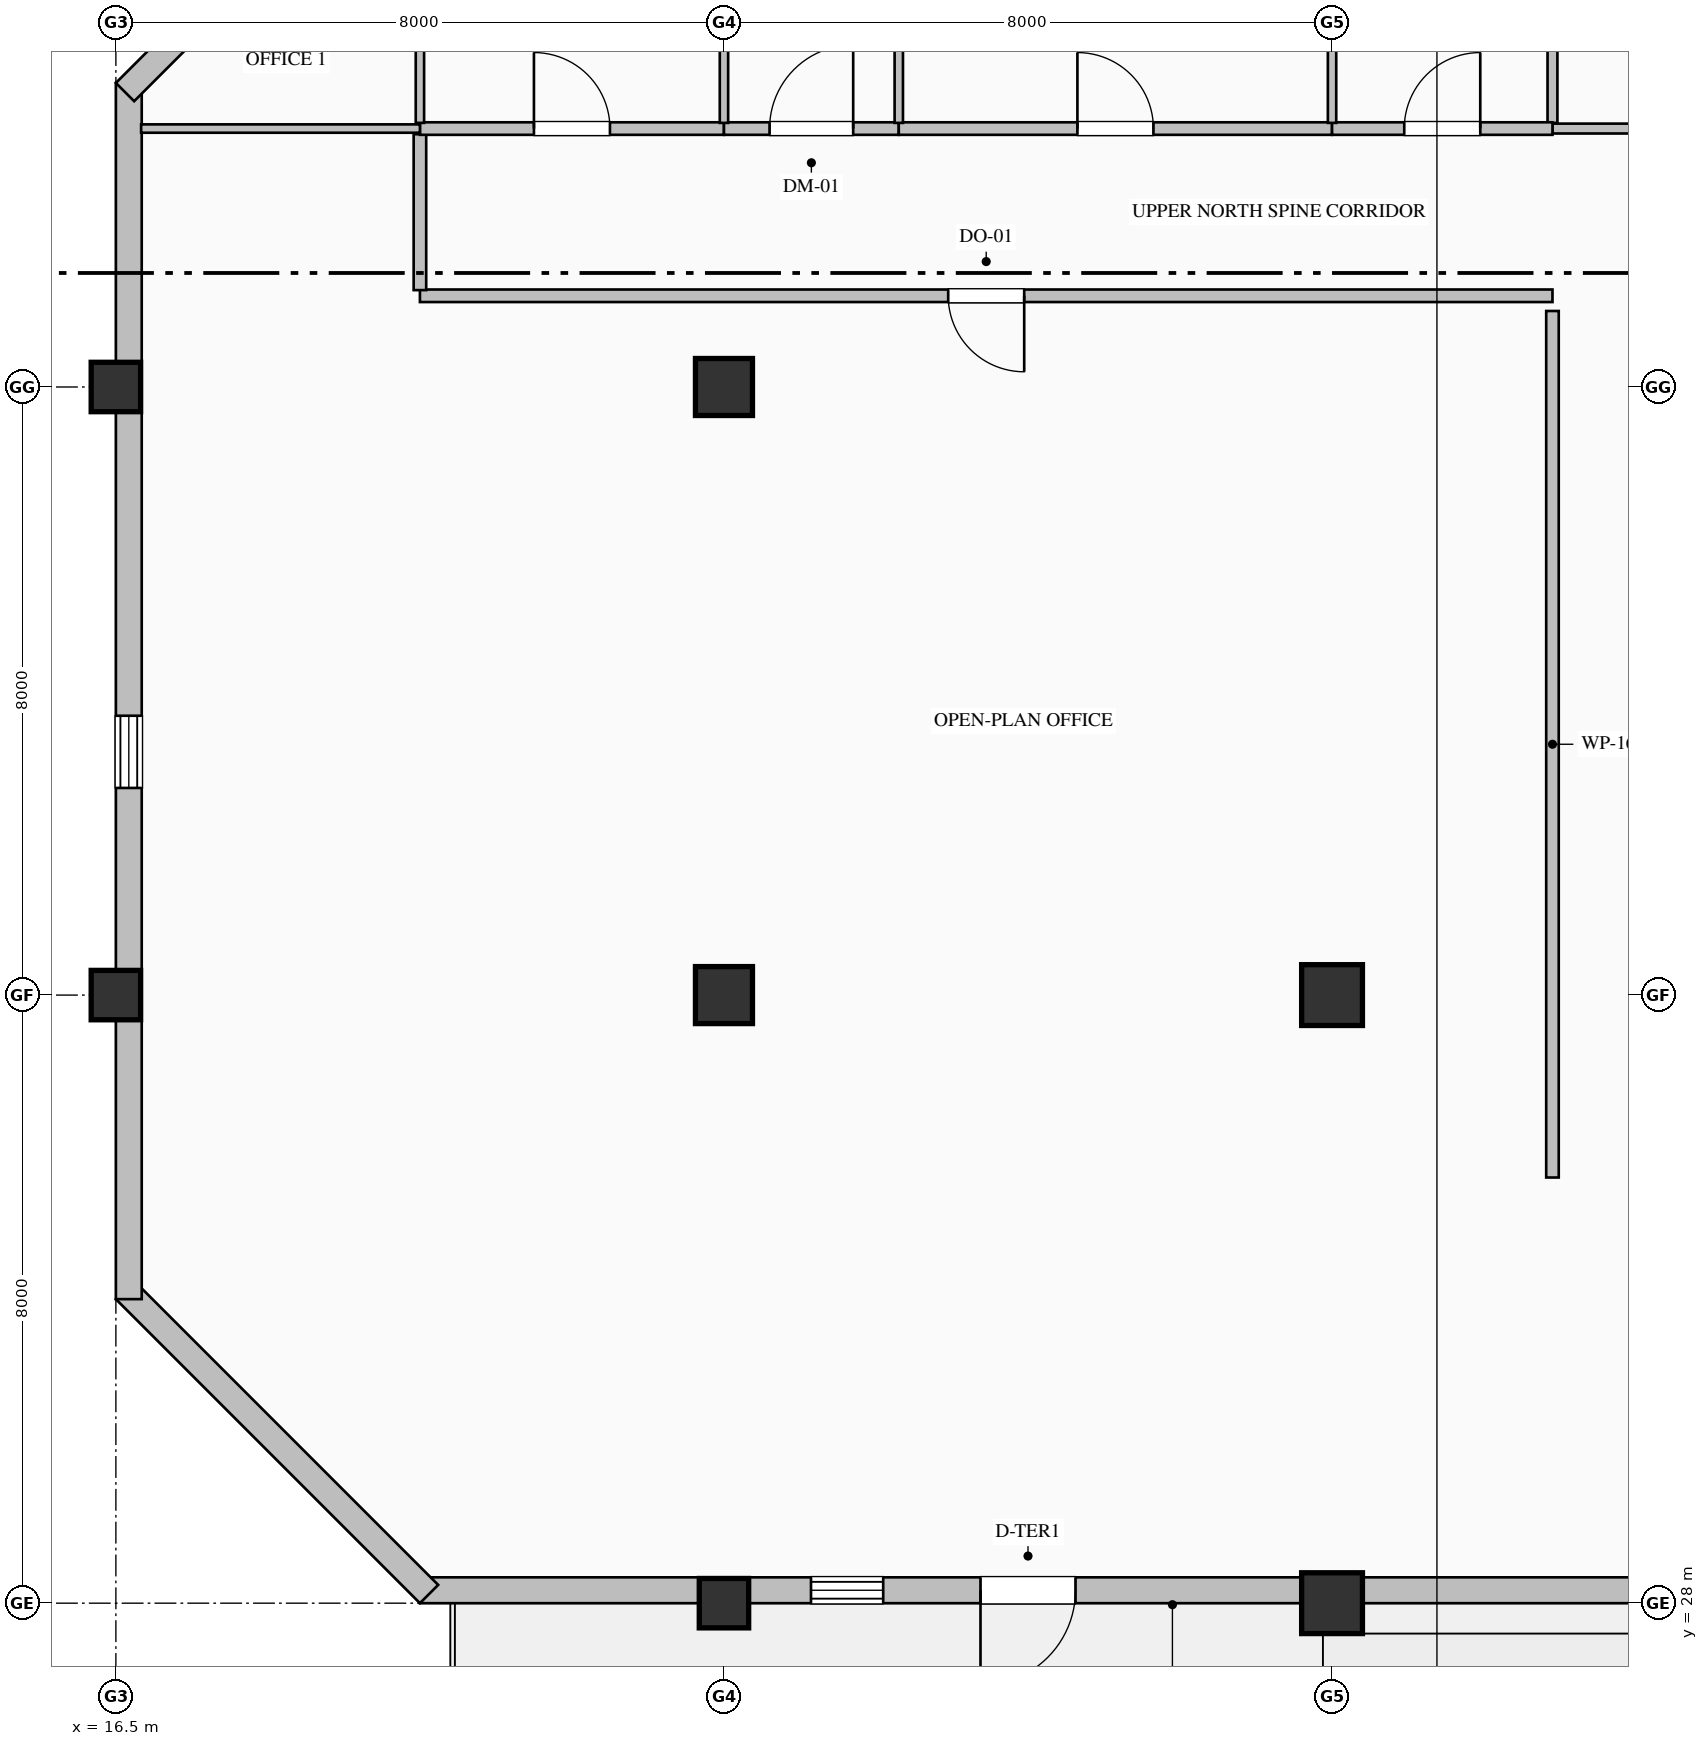
"""IFC4 building model, lengths in metres.
Left out: names, types, materials, properties, quantities, classifications, styles, units other than length and angle.
Written with IfcOpenShell. Run it as: python <this file> out.ifc"""

import sys

from ifc_helpers import new_model, si_unit, direction, frame, frame_2d, origin, origin_2d, place, context, subcontext, project, spatial, rectangle, hollow_rectangle, extrude, element, fill, save


model = new_model("IFC4")
c1 = context("Model", 3, precision=1e-05, world=origin(), true_north=direction((0.0, 1.0)))
c2 = subcontext(c1, "Body", "Model", "MODEL_VIEW")
j1 = project(units=[si_unit("LENGTHUNIT", "METRE"), si_unit("PLANEANGLEUNIT", "RADIAN")], contexts=[c1])
p1 = place(None, origin())
s1 = spatial("IfcSite", under=j1, at=p1, CompositionType="ELEMENT")
p2 = place(p1, origin())
s2 = spatial("IfcBuilding", under=s1, at=p2, CompositionType="ELEMENT")
p3 = place(p2, frame((0.0, 0.0, 295.2)))
s3 = spatial("IfcBuildingStorey", under=s2, at=p3, CompositionType="ELEMENT", Elevation=295.2)
for number, where, z_axis, x_axis in (
    (1, (16.5, 36.0, 0.0), (0.0, 0.0, 1.0), (1.0, 0.0, 0.0)),
    (2, (16.5, 44.0, 0.0), (0.0, 0.0, 1.0), (1.0, 0.0, 0.0)),
    (3, (24.5, 28.0, 0.0), (0.0, 0.0, 1.0), (1.0, 0.0, 0.0)),
):
    element("IfcColumn", number, at=place(p3, frame(where, z_axis=z_axis, x_axis=x_axis)), inside=s3, PredefinedType="COLUMN", context=c2, shape_type="SweptSolid", body=[
        extrude(hollow_rectangle(XDim=0.65, YDim=0.65, WallThickness=0.028, at=origin_2d()), origin(), (0.0, 0.0, 1.0), 4.0),
    ])
for number, where, z_axis, x_axis in (
    (4, (24.5, 36.0, 0.0), (0.0, 0.0, 1.0), (1.0, 0.0, 0.0)),
    (5, (24.5, 44.0, 0.0), (0.0, 0.0, 1.0), (1.0, 0.0, 0.0)),
):
    element("IfcColumn", number, at=place(p3, frame(where, z_axis=z_axis, x_axis=x_axis)), inside=s3, PredefinedType="COLUMN", context=c2, shape_type="SweptSolid", body=[
        extrude(rectangle(XDim=0.75, YDim=0.75, at=origin_2d()), origin(), (0.0, 0.0, 1.0), 4.0),
    ])
for number, where, z_axis, x_axis in (
    (6, (32.5, 28.0, 0.0), (0.0, 0.0, 1.0), (1.0, 0.0, 0.0)),
    (7, (32.5, 36.0, 0.0), (0.0, 0.0, 1.0), (1.0, 0.0, 0.0)),
):
    element("IfcColumn", number, at=place(p3, frame(where, z_axis=z_axis, x_axis=x_axis)), inside=s3, PredefinedType="COLUMN", context=c2, shape_type="SweptSolid", body=[
        extrude(hollow_rectangle(XDim=0.8, YDim=0.8, WallThickness=0.032, at=origin_2d()), origin(), (0.0, 0.0, 1.0), 4.0),
    ])
p4 = place(p3, frame((40.52, 28.17, 0.0), z_axis=(0.0, 0.0, 1.0), x_axis=(-1.0, 0.0, 0.0)))
e8 = element("IfcWall", 8, at=p4, inside=s3, PredefinedType="SOLIDWALL", context=c2, shape_type="SweptSolid", body=[
    extrude(rectangle(XDim=20.02, YDim=0.34, at=frame_2d((10.01, 0.0))), origin(), (0.0, 0.0, 1.0), 3.185),
])
p5 = place(p4, frame((3.125, 0.0, 0.9)))
e9 = element("IfcOpeningElement", 9, at=p5, cuts=e8, PredefinedType="OPENING", context=c2, shape_type="SweptSolid", body=[
    extrude(rectangle(XDim=0.95, YDim=1.85, at=frame_2d((0.475, 0.925))), frame((0.0, 0.18, 0.0), z_axis=(0.0, -1.0, 0.0), x_axis=(1.0, 0.0, 0.0)), (0.0, 0.0, 1.0), 0.36),
])
p6 = place(p4, frame((13.925, 0.0, 0.9)))
e10 = element("IfcOpeningElement", 10, at=p6, cuts=e8, PredefinedType="OPENING", context=c2, shape_type="SweptSolid", body=[
    extrude(rectangle(XDim=0.95, YDim=1.85, at=frame_2d((0.475, 0.925))), frame((0.0, 0.18, 0.0), z_axis=(0.0, -1.0, 0.0), x_axis=(1.0, 0.0, 0.0)), (0.0, 0.0, 1.0), 0.36),
])
p7 = place(p4, frame((11.395, 0.0, 0.0)))
e11 = element("IfcOpeningElement", 11, at=p7, cuts=e8, PredefinedType="OPENING", context=c2, shape_type="SweptSolid", body=[
    extrude(rectangle(XDim=1.25, YDim=2.25, at=frame_2d((0.625, 1.125))), frame((0.0, 0.18, 0.0), z_axis=(0.0, -1.0, 0.0), x_axis=(1.0, 0.0, 0.0)), (0.0, 0.0, 1.0), 0.36),
])
p8 = place(p3, frame((20.62, 28.12, 0.0), z_axis=(0.0, 0.0, 1.0), x_axis=(-0.707106781187, 0.707106781187, 0.0)))
e12 = element("IfcWall", 12, at=p8, inside=s3, PredefinedType="SOLIDWALL", context=c2, shape_type="SweptSolid", body=[
    extrude(rectangle(XDim=5.657, YDim=0.34, at=frame_2d((2.828, 0.0))), origin(), (0.0, 0.0, 1.0), 3.785),
])
p9 = place(p3, frame((16.67, 32.0, 0.0), z_axis=(0.0, 0.0, 1.0), x_axis=(0.0, 1.0, 0.0)))
e13 = element("IfcWall", 13, at=p9, inside=s3, PredefinedType="SOLIDWALL", context=c2, shape_type="SweptSolid", body=[
    extrude(rectangle(XDim=16.0, YDim=0.34, at=frame_2d((8.0, 0.0))), origin(), (0.0, 0.0, 1.0), 3.335),
])
p10 = place(p9, frame((6.725, 0.0, 0.9)))
e14 = element("IfcOpeningElement", 14, at=p10, cuts=e13, PredefinedType="OPENING", context=c2, shape_type="SweptSolid", body=[
    extrude(rectangle(XDim=0.95, YDim=1.85, at=frame_2d((0.475, 0.925))), frame((0.0, 0.18, 0.0), z_axis=(0.0, -1.0, 0.0), x_axis=(1.0, 0.0, 0.0)), (0.0, 0.0, 1.0), 0.36),
])
p11 = place(p3, frame((16.62, 47.88, 0.0), z_axis=(0.0, 0.0, 1.0), x_axis=(0.707106781187, 0.707106781187, 0.0)))
e15 = element("IfcWall", 15, at=p11, inside=s3, PredefinedType="SOLIDWALL", context=c2, shape_type="SweptSolid", body=[
    extrude(rectangle(XDim=5.657, YDim=0.34, at=frame_2d((2.828, 0.0))), origin(), (0.0, 0.0, 1.0), 3.785),
])
p12 = place(p3, frame((37.8, 47.4, 0.0), z_axis=(0.0, 0.0, 1.0), x_axis=(-1.0, 0.0, 0.0)))
e16 = element("IfcWall", 16, at=p12, inside=s3, PredefinedType="PARTITIONING", context=c2, shape_type="SweptSolid", body=[
    extrude(rectangle(XDim=2.4, YDim=0.13, at=frame_2d((1.2, 0.0))), origin(), (0.0, 0.0, 1.0), 3.785),
])
p13 = place(p3, frame((35.4, 47.475, 0.0), z_axis=(0.0, 0.0, 1.0), x_axis=(0.0, 1.0, 0.0)))
e17 = element("IfcWall", 17, at=p13, inside=s3, PredefinedType="PARTITIONING", context=c2, shape_type="SweptSolid", body=[
    extrude(rectangle(XDim=4.193, YDim=0.13, at=frame_2d((2.097, 0.0))), origin(), (0.0, 0.0, 1.0), 3.785),
])
p14 = place(p3, frame((35.4, 45.2, 0.0), z_axis=(0.0, 0.0, 1.0), x_axis=(-1.0, 0.0, 0.0)))
e18 = element("IfcWall", 18, at=p14, inside=s3, PredefinedType="PARTITIONING", context=c2, shape_type="SweptSolid", body=[
    extrude(rectangle(XDim=14.9, YDim=0.165, at=frame_2d((7.45, 0.0))), origin(), (0.0, 0.0, 1.0), 3.785),
])
p15 = place(p14, frame((6.95, 0.0, 0.0)))
e19 = element("IfcOpeningElement", 19, at=p15, cuts=e18, PredefinedType="OPENING", context=c2, shape_type="SweptSolid", body=[
    extrude(rectangle(XDim=1.0, YDim=2.15, at=frame_2d((0.5, 1.075))), frame((0.0, 0.093, 0.0), z_axis=(0.0, -1.0, 0.0), x_axis=(1.0, 0.0, 0.0)), (0.0, 0.0, 1.0), 0.185),
])
p16 = place(p3, frame((20.5, 45.274, 0.0), z_axis=(0.0, 0.0, 1.0), x_axis=(0.0, 1.0, 0.0)))
e20 = element("IfcWall", 20, at=p16, inside=s3, PredefinedType="PARTITIONING", context=c2, shape_type="SweptSolid", body=[
    extrude(rectangle(XDim=2.051, YDim=0.165, at=frame_2d((1.025, 0.0))), origin(), (0.0, 0.0, 1.0), 3.785),
])
p17 = place(p3, frame((20.5, 47.4, 0.0), z_axis=(0.0, 0.0, 1.0), x_axis=(1.0, 0.0, 0.0)))
e21 = element("IfcWall", 21, at=p17, inside=s3, PredefinedType="PARTITIONING", context=c2, shape_type="SweptSolid", body=[
    extrude(rectangle(XDim=4.0, YDim=0.165, at=frame_2d((2.0, 0.0))), origin(), (0.0, 0.0, 1.0), 3.785),
])
p18 = place(p17, frame((1.5, 0.0, 0.0)))
e22 = element("IfcOpeningElement", 22, at=p18, cuts=e21, PredefinedType="OPENING", context=c2, shape_type="SweptSolid", body=[
    extrude(rectangle(XDim=1.0, YDim=2.15, at=frame_2d((0.5, 1.075))), frame((0.0, 0.093, 0.0), z_axis=(0.0, -1.0, 0.0), x_axis=(1.0, 0.0, 0.0)), (0.0, 0.0, 1.0), 0.185),
])
p19 = place(p3, frame((24.5, 47.4, 0.0), z_axis=(0.0, 0.0, 1.0), x_axis=(1.0, 0.0, 0.0)))
e23 = element("IfcWall", 23, at=p19, inside=s3, PredefinedType="PARTITIONING", context=c2, shape_type="SweptSolid", body=[
    extrude(rectangle(XDim=2.3, YDim=0.165, at=frame_2d((1.15, 0.0))), origin(), (0.0, 0.0, 1.0), 3.785),
])
p20 = place(p19, frame((0.6, 0.0, 0.0)))
e24 = element("IfcOpeningElement", 24, at=p20, cuts=e23, PredefinedType="OPENING", context=c2, shape_type="SweptSolid", body=[
    extrude(rectangle(XDim=1.1, YDim=2.2, at=frame_2d((0.55, 1.1))), frame((0.0, 0.093, 0.0), z_axis=(0.0, -1.0, 0.0), x_axis=(1.0, 0.0, 0.0)), (0.0, 0.0, 1.0), 0.185),
])
p21 = place(p3, frame((26.8, 47.4, 0.0), z_axis=(0.0, 0.0, 1.0), x_axis=(1.0, 0.0, 0.0)))
e25 = element("IfcWall", 25, at=p21, inside=s3, PredefinedType="PARTITIONING", context=c2, shape_type="SweptSolid", body=[
    extrude(rectangle(XDim=5.7, YDim=0.165, at=frame_2d((2.85, 0.0))), origin(), (0.0, 0.0, 1.0), 3.785),
])
p22 = place(p21, frame((2.35, 0.0, 0.0)))
e26 = element("IfcOpeningElement", 26, at=p22, cuts=e25, PredefinedType="OPENING", context=c2, shape_type="SweptSolid", body=[
    extrude(rectangle(XDim=1.0, YDim=2.15, at=frame_2d((0.5, 1.075))), frame((0.0, 0.093, 0.0), z_axis=(0.0, -1.0, 0.0), x_axis=(1.0, 0.0, 0.0)), (0.0, 0.0, 1.0), 0.185),
])
p23 = place(p3, frame((32.5, 47.4, 0.0), z_axis=(0.0, 0.0, 1.0), x_axis=(1.0, 0.0, 0.0)))
e27 = element("IfcWall", 27, at=p23, inside=s3, PredefinedType="PARTITIONING", context=c2, shape_type="SweptSolid", body=[
    extrude(rectangle(XDim=2.9, YDim=0.165, at=frame_2d((1.45, 0.0))), origin(), (0.0, 0.0, 1.0), 3.785),
])
p24 = place(p23, frame((0.95, 0.0, 0.0)))
e28 = element("IfcOpeningElement", 28, at=p24, cuts=e27, PredefinedType="OPENING", context=c2, shape_type="SweptSolid", body=[
    extrude(rectangle(XDim=1.0, YDim=2.15, at=frame_2d((0.5, 1.075))), frame((0.0, 0.093, 0.0), z_axis=(0.0, -1.0, 0.0), x_axis=(1.0, 0.0, 0.0)), (0.0, 0.0, 1.0), 0.185),
])
p25 = place(p3, frame((35.4, 33.6, 0.0), z_axis=(0.0, 0.0, 1.0), x_axis=(0.0, 1.0, 0.0)))
e29 = element("IfcWall", 29, at=p25, inside=s3, PredefinedType="PARTITIONING", context=c2, shape_type="SweptSolid", body=[
    extrude(rectangle(XDim=11.4, YDim=0.165, at=frame_2d((5.7, 0.0))), origin(), (0.0, 0.0, 1.0), 3.785),
])
p26 = place(p3, frame((16.832, 47.4, 0.0), z_axis=(0.0, 0.0, 1.0), x_axis=(1.0, 0.0, 0.0)))
e30 = element("IfcWall", 30, at=p26, inside=s3, PredefinedType="MOVABLE", context=c2, shape_type="SweptSolid", body=[
    extrude(rectangle(XDim=3.668, YDim=0.11, at=frame_2d((1.834, 0.0))), origin(), (0.0, 0.0, 1.0), 3.785),
])
p27 = place(p3, frame((20.5, 51.531, 0.0), z_axis=(0.0, 0.0, 1.0), x_axis=(0.0, -1.0, 0.0)))
e31 = element("IfcWall", 31, at=p27, inside=s3, PredefinedType="MOVABLE", context=c2, shape_type="SweptSolid", body=[
    extrude(rectangle(XDim=4.056, YDim=0.11, at=frame_2d((2.028, 0.0))), origin(), (0.0, 0.0, 1.0), 3.785),
])
p28 = place(p27, frame((1.528, 0.0, 0.0)))
e32 = element("IfcOpeningElement", 32, at=p28, cuts=e31, PredefinedType="OPENING", context=c2, shape_type="SweptSolid", body=[
    extrude(rectangle(XDim=1.0, YDim=2.15, at=frame_2d((0.5, 1.075))), frame((0.0, 0.065, 0.0), z_axis=(0.0, -1.0, 0.0), x_axis=(1.0, 0.0, 0.0)), (0.0, 0.0, 1.0), 0.13),
])
p29 = place(p3, frame((24.5, 51.668, 0.0), z_axis=(0.0, 0.0, 1.0), x_axis=(0.0, -1.0, 0.0)))
e33 = element("IfcWall", 33, at=p29, inside=s3, PredefinedType="MOVABLE", context=c2, shape_type="SweptSolid", body=[
    extrude(rectangle(XDim=4.193, YDim=0.11, at=frame_2d((2.097, 0.0))), origin(), (0.0, 0.0, 1.0), 3.177),
])
for number, where, z_axis, x_axis in (
    (34, (26.8, 51.668, 0.0), (0.0, 0.0, 1.0), (0.0, -1.0, 0.0)),
    (35, (32.5, 51.668, 0.0), (0.0, 0.0, 1.0), (0.0, -1.0, 0.0)),
):
    element("IfcWall", number, at=place(p3, frame(where, z_axis=z_axis, x_axis=x_axis)), inside=s3, PredefinedType="MOVABLE", context=c2, shape_type="SweptSolid", body=[
        extrude(rectangle(XDim=4.193, YDim=0.11, at=frame_2d((2.097, 0.0))), origin(), (0.0, 0.0, 1.0), 3.785),
    ])
p30 = place(p6, origin())
e36 = element("IfcWindow", 36, at=p30, inside=s3, PartitioningType="SINGLE_PANEL", PredefinedType="WINDOW", context=c2, shape_type="SweptSolid", body=[
    extrude(rectangle(XDim=0.95, YDim=1.85, at=frame_2d((0.475, 0.925))), frame((0.0, 0.15, 0.0), z_axis=(0.0, -1.0, 0.0), x_axis=(1.0, 0.0, 0.0)), (0.0, 0.0, 1.0), 0.06),
])
fill(e10, e36)
p31 = place(p10, origin())
e37 = element("IfcWindow", 37, at=p31, inside=s3, PartitioningType="SINGLE_PANEL", PredefinedType="WINDOW", context=c2, shape_type="SweptSolid", body=[
    extrude(rectangle(XDim=0.95, YDim=1.85, at=frame_2d((0.475, 0.925))), frame((0.0, 0.15, 0.0), z_axis=(0.0, -1.0, 0.0), x_axis=(1.0, 0.0, 0.0)), (0.0, 0.0, 1.0), 0.06),
])
fill(e14, e37)
p32 = place(p7, origin())
e38 = element("IfcDoor", 38, at=p32, inside=s3, OperationType="SINGLE_SWING_RIGHT", PredefinedType="DOOR", context=c2, shape_type="SweptSolid", body=[
    extrude(rectangle(XDim=1.25, YDim=2.25, at=frame_2d((0.625, 1.125))), frame((0.0, 0.025, 0.0), z_axis=(0.0, -1.0, 0.0), x_axis=(1.0, 0.0, 0.0)), (0.0, 0.0, 1.0), 0.05),
])
fill(e11, e38)
p33 = place(p15, origin())
e39 = element("IfcDoor", 39, at=p33, inside=s3, OperationType="SINGLE_SWING_LEFT", PredefinedType="DOOR", context=c2, shape_type="SweptSolid", body=[
    extrude(rectangle(XDim=1.0, YDim=2.15, at=frame_2d((0.5, 1.075))), frame((0.0, 0.025, 0.0), z_axis=(0.0, -1.0, 0.0), x_axis=(1.0, 0.0, 0.0)), (0.0, 0.0, 1.0), 0.05),
])
fill(e19, e39)
p34 = place(p18, origin())
e40 = element("IfcDoor", 40, at=p34, inside=s3, OperationType="SINGLE_SWING_LEFT", PredefinedType="DOOR", context=c2, shape_type="SweptSolid", body=[
    extrude(rectangle(XDim=1.0, YDim=2.15, at=frame_2d((0.5, 1.075))), frame((0.0, 0.025, 0.0), z_axis=(0.0, -1.0, 0.0), x_axis=(1.0, 0.0, 0.0)), (0.0, 0.0, 1.0), 0.05),
])
fill(e22, e40)
p35 = place(p20, origin())
e41 = element("IfcDoor", 41, at=p35, inside=s3, OperationType="SINGLE_SWING_RIGHT", PredefinedType="DOOR", context=c2, shape_type="SweptSolid", body=[
    extrude(rectangle(XDim=1.1, YDim=2.2, at=frame_2d((0.55, 1.1))), frame((0.0, 0.025, 0.0), z_axis=(0.0, -1.0, 0.0), x_axis=(1.0, 0.0, 0.0)), (0.0, 0.0, 1.0), 0.05),
])
fill(e24, e41)
p36 = place(p22, origin())
e42 = element("IfcDoor", 42, at=p36, inside=s3, OperationType="SINGLE_SWING_LEFT", PredefinedType="DOOR", context=c2, shape_type="SweptSolid", body=[
    extrude(rectangle(XDim=1.0, YDim=2.15, at=frame_2d((0.5, 1.075))), frame((0.0, 0.025, 0.0), z_axis=(0.0, -1.0, 0.0), x_axis=(1.0, 0.0, 0.0)), (0.0, 0.0, 1.0), 0.05),
])
fill(e26, e42)
p37 = place(p24, origin())
e43 = element("IfcDoor", 43, at=p37, inside=s3, OperationType="SINGLE_SWING_RIGHT", PredefinedType="DOOR", context=c2, shape_type="SweptSolid", body=[
    extrude(rectangle(XDim=1.0, YDim=2.15, at=frame_2d((0.5, 1.075))), frame((0.0, 0.025, 0.0), z_axis=(0.0, -1.0, 0.0), x_axis=(1.0, 0.0, 0.0)), (0.0, 0.0, 1.0), 0.05),
])
fill(e28, e43)
save(model, sys.argv[1])
